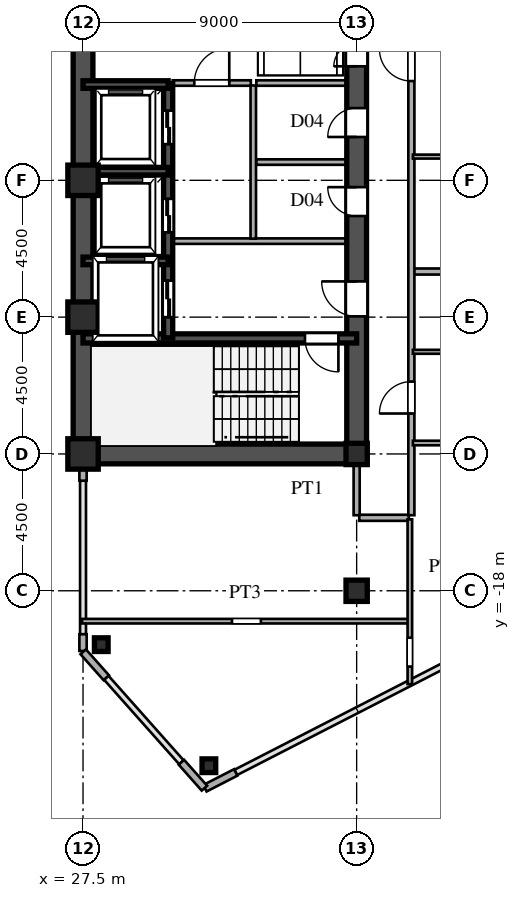
"""IFC4 building model, lengths in metres.
Left out: names, types, materials, properties, quantities, classifications, styles, units other than length and angle.
Written with IfcOpenShell. Run it as: python <this file> out.ifc"""

import sys

from ifc_helpers import new_model, si_unit, direction, frame, frame_2d, origin, origin_2d, place, context, subcontext, project, spatial, rectangle, hollow_rectangle, i_section, extrude, source, transform, mapped, element, fill, save


model = new_model("IFC4")
c1 = context("Model", 3, precision=1e-05, world=origin(), true_north=direction((0.0, 1.0)))
c2 = subcontext(c1, "Body", "Model", "MODEL_VIEW")
j1 = project(units=[si_unit("LENGTHUNIT", "METRE"), si_unit("PLANEANGLEUNIT", "RADIAN")], contexts=[c1])
p1 = place(None, origin())
s1 = spatial("IfcSite", under=j1, at=p1, CompositionType="ELEMENT")
p2 = place(p1, origin())
s2 = spatial("IfcBuilding", under=s1, at=p2, CompositionType="ELEMENT")
p3 = place(p2, frame((0.0, 0.0, 114.0)))
s3 = spatial("IfcBuildingStorey", under=s2, at=p3, CompositionType="ELEMENT", Elevation=114.0)
m1 = source(origin(), c2, "Body", "SweptSolid", [
    extrude(hollow_rectangle(XDim=1.0, YDim=1.0, WallThickness=0.042, at=origin_2d()), origin(), (0.0, 0.0, 1.0), 3.6),
])
for number, where, z_axis, x_axis in (
    (1, (27.5, -13.5, 0.0), (0.0, 0.0, 1.0), (1.0, 0.0, 0.0)),
    (2, (27.5, -9.0, 0.0), (0.0, 0.0, 1.0), (1.0, 0.0, 0.0)),
    (3, (27.5, -4.5, 0.0), (0.0, 0.0, 1.0), (1.0, 0.0, 0.0)),
):
    element("IfcColumn", number, at=place(p3, frame(where, z_axis=z_axis, x_axis=x_axis)), inside=s3, PredefinedType="COLUMN", context=c2, shape_type="MappedRepresentation", body=[
        mapped(m1, transform((0.0, 0.0, 0.0), scale=1.0)),
    ])
m2 = source(origin(), c2, "Body", "SweptSolid", [
    extrude(i_section(OverallWidth=0.7, OverallDepth=0.7, WebThickness=0.028, FlangeThickness=0.045, at=origin_2d()), origin(), (0.0, 0.0, 1.0), 3.6),
])
for number, where, z_axis, x_axis in (
    (4, (36.5, -18.0, 0.0), (0.0, 0.0, 1.0), (1.0, 0.0, 0.0)),
    (5, (36.5, -13.5, 0.0), (0.0, 0.0, 1.0), (1.0, 0.0, 0.0)),
):
    element("IfcColumn", number, at=place(p3, frame(where, z_axis=z_axis, x_axis=x_axis)), inside=s3, PredefinedType="COLUMN", context=c2, shape_type="MappedRepresentation", body=[
        mapped(m2, transform((0.0, 0.0, 0.0), scale=1.0)),
    ])
m3 = source(origin(), c2, "Body", "SweptSolid", [
    extrude(hollow_rectangle(XDim=0.45, YDim=0.45, WallThickness=0.018, at=origin_2d()), origin(), (0.0, 0.0, 1.0), 3.6),
])
for number, where, z_axis, x_axis in (
    (6, (31.64, -23.754, 0.0), (0.0, 0.0, 1.0), (1.0, 0.0, 0.0)),
    (7, (28.1, -19.772, 0.0), (0.0, 0.0, 1.0), (1.0, 0.0, 0.0)),
):
    element("IfcColumn", number, at=place(p3, frame(where, z_axis=z_axis, x_axis=x_axis)), inside=s3, PredefinedType="COLUMN", context=c2, shape_type="MappedRepresentation", body=[
        mapped(m3, transform((0.0, 0.0, 0.0), scale=1.0)),
    ])
p4 = place(p3, frame((31.509, -24.495, 0.0), z_axis=(0.0, 0.0, 1.0), x_axis=(0.889797395748, 0.456355776255, 0.0)))
e8 = element("IfcWall", 8, at=p4, inside=s3, PredefinedType="SOLIDWALL", context=c2, shape_type="SweptSolid", body=[
    extrude(rectangle(XDim=1.14, YDim=0.24, at=frame_2d((0.57, 0.0))), origin(), (0.0, 0.0, 1.0), 3.38),
])
p5 = place(p3, frame((27.5, -19.98, 0.0), z_axis=(0.0, 0.0, 1.0), x_axis=(0.0, 1.0, 0.0)))
e9 = element("IfcWall", 9, at=p5, inside=s3, PredefinedType="SOLIDWALL", context=c2, shape_type="SweptSolid", body=[
    extrude(rectangle(XDim=0.55, YDim=0.24, at=frame_2d((0.275, 0.0))), origin(), (0.0, 0.0, 1.0), 3.38),
])
p6 = place(p3, frame((27.5, -14.38, 0.0), z_axis=(0.0, 0.0, 1.0), x_axis=(0.0, 1.0, 0.0)))
e10 = element("IfcWall", 10, at=p6, inside=s3, PredefinedType="SOLIDWALL", context=c2, shape_type="SweptSolid", body=[
    extrude(rectangle(XDim=0.55, YDim=0.24, at=frame_2d((0.275, 0.0))), origin(), (0.0, 0.0, 1.0), 2.88),
])
for number, where, z_axis, x_axis in (
    (11, (27.507, -20.008, 0.0), (0.0, 0.0, 1.0), (0.664, -0.747, 0.0)),
    (12, (30.736, -23.64, 0.0), (0.0, 0.0, 1.0), (0.664, -0.747, 0.0)),
):
    element("IfcWall", number, at=place(p3, frame(where, z_axis=z_axis, x_axis=x_axis)), inside=s3, PredefinedType="SOLIDWALL", context=c2, shape_type="SweptSolid", body=[
        extrude(rectangle(XDim=1.14, YDim=0.24, at=frame_2d((0.57, 0.0))), origin(), (0.0, 0.0, 1.0), 3.38),
    ])
p7 = place(p3, frame((27.5, -13.5, 0.0), z_axis=(0.0, 0.0, 1.0), x_axis=(0.0, 1.0, 0.0)))
e13 = element("IfcWall", 13, at=p7, inside=s3, PredefinedType="SHEAR", context=c2, shape_type="SweptSolid", body=[
    extrude(rectangle(XDim=12.2, YDim=0.65, at=frame_2d((6.1, 0.0))), origin(), (0.0, 0.0, 1.0), 3.38),
])
p8 = place(p3, frame((27.5, -1.3, 0.0), z_axis=(0.0, 0.0, 1.0), x_axis=(0.0, 1.0, 0.0)))
e14 = element("IfcWall", 14, at=p8, inside=s3, PredefinedType="SHEAR", context=c2, shape_type="SweptSolid", body=[
    extrude(rectangle(XDim=2.6, YDim=0.65, at=frame_2d((1.3, 0.0))), origin(), (0.0, 0.0, 1.0), 3.38),
])
p9 = place(p3, frame((27.5, -13.5, 0.0), z_axis=(0.0, 0.0, 1.0), x_axis=(1.0, 0.0, 0.0)))
e15 = element("IfcWall", 15, at=p9, inside=s3, PredefinedType="SHEAR", context=c2, shape_type="SweptSolid", body=[
    extrude(rectangle(XDim=9.0, YDim=0.65, at=frame_2d((4.5, 0.0))), origin(), (0.0, 0.0, 1.0), 3.38),
])
p10 = place(p3, frame((36.5, -13.65, 0.0), z_axis=(0.0, 0.0, 1.0), x_axis=(0.0, 1.0, 0.0)))
e16 = element("IfcWall", 16, at=p10, inside=s3, PredefinedType="SHEAR", context=c2, shape_type="SweptSolid", body=[
    extrude(rectangle(XDim=7.15, YDim=0.65, at=frame_2d((3.575, 0.0))), origin(), (0.0, 0.0, 1.0), 3.38),
])
p11 = place(p10, frame((4.675, 0.0, 0.0)))
e17 = element("IfcOpeningElement", 17, at=p11, cuts=e16, PredefinedType="OPENING", context=c2, shape_type="SweptSolid", body=[
    extrude(rectangle(XDim=1.15, YDim=2.2, at=frame_2d((0.575, 1.1))), frame((0.0, 0.335, 0.0), z_axis=(0.0, -1.0, 0.0), x_axis=(1.0, 0.0, 0.0)), (0.0, 0.0, 1.0), 0.67),
])
p12 = place(p3, frame((36.5, -1.3, 0.0), z_axis=(0.0, 0.0, 1.0), x_axis=(0.0, 1.0, 0.0)))
e18 = element("IfcWall", 18, at=p12, inside=s3, PredefinedType="SHEAR", context=c2, shape_type="SweptSolid", body=[
    extrude(rectangle(XDim=2.6, YDim=0.65, at=frame_2d((1.3, 0.0))), origin(), (0.0, 0.0, 1.0), 3.38),
])
p13 = place(p12, frame((0.55, 0.0, 0.0)))
e19 = element("IfcOpeningElement", 19, at=p13, cuts=e18, PredefinedType="OPENING", context=c2, shape_type="SweptSolid", body=[
    extrude(rectangle(XDim=1.5, YDim=2.3, at=frame_2d((0.75, 1.15))), frame((0.0, 0.335, 0.0), z_axis=(0.0, -1.0, 0.0), x_axis=(1.0, 0.0, 0.0)), (0.0, 0.0, 1.0), 0.67),
])
p14 = place(p3, frame((36.5, -6.5, 0.0), z_axis=(0.0, 0.0, 1.0), x_axis=(0.0, 1.0, 0.0)))
e20 = element("IfcWall", 20, at=p14, inside=s3, PredefinedType="SHEAR", context=c2, shape_type="SweptSolid", body=[
    extrude(rectangle(XDim=2.6, YDim=0.65, at=frame_2d((1.3, 0.0))), origin(), (0.0, 0.0, 1.0), 3.38),
])
p15 = place(p14, frame((0.825, 0.0, 0.0)))
e21 = element("IfcOpeningElement", 21, at=p15, cuts=e20, PredefinedType="OPENING", context=c2, shape_type="SweptSolid", body=[
    extrude(rectangle(XDim=0.95, YDim=2.15, at=frame_2d((0.475, 1.075))), frame((0.0, 0.335, 0.0), z_axis=(0.0, -1.0, 0.0), x_axis=(1.0, 0.0, 0.0)), (0.0, 0.0, 1.0), 0.67),
])
p16 = place(p3, frame((36.5, -3.9, 0.0), z_axis=(0.0, 0.0, 1.0), x_axis=(0.0, 1.0, 0.0)))
e22 = element("IfcWall", 22, at=p16, inside=s3, PredefinedType="SHEAR", context=c2, shape_type="SweptSolid", body=[
    extrude(rectangle(XDim=2.6, YDim=0.65, at=frame_2d((1.3, 0.0))), origin(), (0.0, 0.0, 1.0), 3.38),
])
p17 = place(p16, frame((0.825, 0.0, 0.0)))
e23 = element("IfcOpeningElement", 23, at=p17, cuts=e22, PredefinedType="OPENING", context=c2, shape_type="SweptSolid", body=[
    extrude(rectangle(XDim=0.95, YDim=2.15, at=frame_2d((0.475, 1.075))), frame((0.0, 0.335, 0.0), z_axis=(0.0, -1.0, 0.0), x_axis=(1.0, 0.0, 0.0)), (0.0, 0.0, 1.0), 0.67),
])
p18 = place(p3, frame((27.5, -9.7, 0.0), z_axis=(0.0, 0.0, 1.0), x_axis=(1.0, 0.0, 0.0)))
e24 = element("IfcWall", 24, at=p18, inside=s3, PredefinedType="SHEAR", context=c2, shape_type="SweptSolid", body=[
    extrude(rectangle(XDim=9.0, YDim=0.3, at=frame_2d((4.5, 0.0))), origin(), (0.0, 0.0, 1.0), 3.38),
])
p19 = place(p18, frame((7.3, 0.0, 0.0)))
e25 = element("IfcOpeningElement", 25, at=p19, cuts=e24, PredefinedType="OPENING", context=c2, shape_type="SweptSolid", body=[
    extrude(rectangle(XDim=1.1, YDim=2.2, at=frame_2d((0.55, 1.1))), frame((0.0, 0.16, 0.0), z_axis=(0.0, -1.0, 0.0), x_axis=(1.0, 0.0, 0.0)), (0.0, 0.0, 1.0), 0.32),
])
for number, where, z_axis, x_axis in (
    (26, (27.5, -7.15, 0.0), (0.0, 0.0, 1.0), (1.0, 0.0, 0.0)),
    (27, (27.5, -4.2, 0.0), (0.0, 0.0, 1.0), (1.0, 0.0, 0.0)),
    (28, (27.5, -1.35, 0.0), (0.0, 0.0, 1.0), (1.0, 0.0, 0.0)),
):
    element("IfcWall", number, at=place(p3, frame(where, z_axis=z_axis, x_axis=x_axis)), inside=s3, PredefinedType="SHEAR", context=c2, shape_type="SweptSolid", body=[
        extrude(rectangle(XDim=2.8, YDim=0.25, at=frame_2d((1.4, 0.0))), origin(), (0.0, 0.0, 1.0), 3.38),
    ])
p20 = place(p3, frame((30.3, -9.68, 0.0), z_axis=(0.0, 0.0, 1.0), x_axis=(0.0, 1.0, 0.0)))
e29 = element("IfcWall", 29, at=p20, inside=s3, PredefinedType="SHEAR", context=c2, shape_type="SweptSolid", body=[
    extrude(rectangle(XDim=2.56, YDim=0.3, at=frame_2d((1.28, 0.0))), origin(), (0.0, 0.0, 1.0), 3.38),
])
p21 = place(p20, frame((0.68, 0.0, 0.0)))
e30 = element("IfcOpeningElement", 30, at=p21, cuts=e29, PredefinedType="OPENING", context=c2, shape_type="SweptSolid", body=[
    extrude(rectangle(XDim=1.2, YDim=2.25, at=frame_2d((0.6, 1.125))), frame((0.0, 0.16, 0.0), z_axis=(0.0, -1.0, 0.0), x_axis=(1.0, 0.0, 0.0)), (0.0, 0.0, 1.0), 0.32),
])
p22 = place(p3, frame((30.3, -7.12, 0.0), z_axis=(0.0, 0.0, 1.0), x_axis=(0.0, 1.0, 0.0)))
e31 = element("IfcWall", 31, at=p22, inside=s3, PredefinedType="SHEAR", context=c2, shape_type="SweptSolid", body=[
    extrude(rectangle(XDim=2.92, YDim=0.3, at=frame_2d((1.46, 0.0))), origin(), (0.0, 0.0, 1.0), 3.38),
])
p23 = place(p22, frame((0.91, 0.0, 0.0)))
e32 = element("IfcOpeningElement", 32, at=p23, cuts=e31, PredefinedType="OPENING", context=c2, shape_type="SweptSolid", body=[
    extrude(rectangle(XDim=1.1, YDim=2.2, at=frame_2d((0.55, 1.1))), frame((0.0, 0.16, 0.0), z_axis=(0.0, -1.0, 0.0), x_axis=(1.0, 0.0, 0.0)), (0.0, 0.0, 1.0), 0.32),
])
p24 = place(p3, frame((30.3, -4.2, 0.0), z_axis=(0.0, 0.0, 1.0), x_axis=(0.0, 1.0, 0.0)))
e33 = element("IfcWall", 33, at=p24, inside=s3, PredefinedType="SHEAR", context=c2, shape_type="SweptSolid", body=[
    extrude(rectangle(XDim=2.88, YDim=0.3, at=frame_2d((1.44, 0.0))), origin(), (0.0, 0.0, 1.0), 3.38),
])
p25 = place(p24, frame((0.89, 0.0, 0.0)))
e34 = element("IfcOpeningElement", 34, at=p25, cuts=e33, PredefinedType="OPENING", context=c2, shape_type="SweptSolid", body=[
    extrude(rectangle(XDim=1.1, YDim=2.2, at=frame_2d((0.55, 1.1))), frame((0.0, 0.16, 0.0), z_axis=(0.0, -1.0, 0.0), x_axis=(1.0, 0.0, 0.0)), (0.0, 0.0, 1.0), 0.32),
])
p26 = place(p3, frame((30.45, -6.5, 0.0), z_axis=(0.0, 0.0, 1.0), x_axis=(1.0, 0.0, 0.0)))
e35 = element("IfcWall", 35, at=p26, inside=s3, PredefinedType="PARTITIONING", context=c2, shape_type="SweptSolid", body=[
    extrude(rectangle(XDim=5.7, YDim=0.18, at=frame_2d((2.85, 0.0))), origin(), (0.0, 0.0, 1.0), 3.38),
])
p27 = place(p3, frame((33.1, -6.42, 0.0), z_axis=(0.0, 0.0, 1.0), x_axis=(0.0, 1.0, 0.0)))
e36 = element("IfcWall", 36, at=p27, inside=s3, PredefinedType="PARTITIONING", context=c2, shape_type="SweptSolid", body=[
    extrude(rectangle(XDim=5.04, YDim=0.18, at=frame_2d((2.52, 0.0))), origin(), (0.0, 0.0, 1.0), 3.38),
])
p28 = place(p3, frame((30.45, -1.3, 0.0), z_axis=(0.0, 0.0, 1.0), x_axis=(1.0, 0.0, 0.0)))
e37 = element("IfcWall", 37, at=p28, inside=s3, PredefinedType="PARTITIONING", context=c2, shape_type="SweptSolid", body=[
    extrude(rectangle(XDim=2.57, YDim=0.18, at=frame_2d((1.285, 0.0))), origin(), (0.0, 0.0, 1.0), 3.38),
])
p29 = place(p28, frame((0.71, 0.0, 0.0)))
e38 = element("IfcOpeningElement", 38, at=p29, cuts=e37, PredefinedType="OPENING", context=c2, shape_type="SweptSolid", body=[
    extrude(rectangle(XDim=1.15, YDim=2.2, at=frame_2d((0.575, 1.1))), frame((0.0, 0.1, 0.0), z_axis=(0.0, -1.0, 0.0), x_axis=(1.0, 0.0, 0.0)), (0.0, 0.0, 1.0), 0.2),
])
for number, where, z_axis, x_axis in (
    (39, (33.2, -1.3, 0.0), (0.0, 0.0, 1.0), (1.0, 0.0, 0.0)),
    (40, (33.2, -3.9, 0.0), (0.0, 0.0, 1.0), (1.0, 0.0, 0.0)),
):
    element("IfcWall", number, at=place(p3, frame(where, z_axis=z_axis, x_axis=x_axis)), inside=s3, PredefinedType="PARTITIONING", context=c2, shape_type="SweptSolid", body=[
        extrude(rectangle(XDim=2.95, YDim=0.18, at=frame_2d((1.475, 0.0))), origin(), (0.0, 0.0, 1.0), 3.38),
    ])
p30 = place(p3, frame((27.465, -19.0, 0.0), z_axis=(0.0, 0.0, 1.0), x_axis=(1.0, 0.0, 0.0)))
e41 = element("IfcWall", 41, at=p30, inside=s3, PredefinedType="PARTITIONING", context=c2, shape_type="SweptSolid", body=[
    extrude(rectangle(XDim=10.735, YDim=0.15, at=frame_2d((5.367, 0.0))), origin(), (0.0, 0.0, 1.0), 3.38),
])
p31 = place(p30, frame((4.935, 0.0, 0.0)))
e42 = element("IfcOpeningElement", 42, at=p31, cuts=e41, PredefinedType="OPENING", context=c2, shape_type="SweptSolid", body=[
    extrude(rectangle(XDim=0.95, YDim=2.15, at=frame_2d((0.475, 1.075))), frame((0.0, 0.085, 0.0), z_axis=(0.0, -1.0, 0.0), x_axis=(1.0, 0.0, 0.0)), (0.0, 0.0, 1.0), 0.17),
])
p32 = place(p3, frame((36.585, -15.6, 0.0), z_axis=(0.0, 0.0, 1.0), x_axis=(1.0, 0.0, 0.0)))
e43 = element("IfcWall", 43, at=p32, inside=s3, PredefinedType="PARTITIONING", context=c2, shape_type="SweptSolid", body=[
    extrude(rectangle(XDim=1.63, YDim=0.2, at=frame_2d((0.815, 0.0))), origin(), (0.0, 0.0, 1.0), 3.38),
])
p33 = place(p3, frame((38.35, -13.14, 0.0), z_axis=(0.0, 0.0, 1.0), x_axis=(1.0, 0.0, 0.0)))
e44 = element("IfcWall", 44, at=p33, inside=s3, PredefinedType="PARTITIONING", context=c2, shape_type="SweptSolid", body=[
    extrude(rectangle(XDim=5.7, YDim=0.15, at=frame_2d((2.85, 0.0))), origin(), (0.0, 0.0, 1.0), 3.38),
])
p34 = place(p33, frame((2.375, 0.0, 0.0)))
e45 = element("IfcOpeningElement", 45, at=p34, cuts=e44, PredefinedType="OPENING", context=c2, shape_type="SweptSolid", body=[
    extrude(rectangle(XDim=0.95, YDim=2.15, at=frame_2d((0.475, 1.075))), frame((0.0, 0.085, 0.0), z_axis=(0.0, -1.0, 0.0), x_axis=(1.0, 0.0, 0.0)), (0.0, 0.0, 1.0), 0.17),
])
p35 = place(p3, frame((38.35, -10.14, 0.0), z_axis=(0.0, 0.0, 1.0), x_axis=(1.0, 0.0, 0.0)))
e46 = element("IfcWall", 46, at=p35, inside=s3, PredefinedType="PARTITIONING", context=c2, shape_type="SweptSolid", body=[
    extrude(rectangle(XDim=5.7, YDim=0.13, at=frame_2d((2.85, 0.0))), origin(), (0.0, 0.0, 1.0), 3.38),
])
p36 = place(p35, frame((2.41, 0.0, 0.0)))
e47 = element("IfcOpeningElement", 47, at=p36, cuts=e46, PredefinedType="OPENING", context=c2, shape_type="SweptSolid", body=[
    extrude(rectangle(XDim=0.88, YDim=2.1, at=frame_2d((0.44, 1.05))), frame((0.0, 0.075, 0.0), z_axis=(0.0, -1.0, 0.0), x_axis=(1.0, 0.0, 0.0)), (0.0, 0.0, 1.0), 0.15),
])
p37 = place(p3, frame((38.38, -7.5, 0.0), z_axis=(0.0, 0.0, 1.0), x_axis=(1.0, 0.0, 0.0)))
e48 = element("IfcWall", 48, at=p37, inside=s3, PredefinedType="PARTITIONING", context=c2, shape_type="SweptSolid", body=[
    extrude(rectangle(XDim=26.259, YDim=0.2, at=frame_2d((13.129, 0.0))), origin(), (0.0, 0.0, 1.0), 3.38),
])
p38 = place(p3, frame((38.35, -3.72, 0.0), z_axis=(0.0, 0.0, 1.0), x_axis=(1.0, 0.0, 0.0)))
e49 = element("IfcWall", 49, at=p38, inside=s3, PredefinedType="PARTITIONING", context=c2, shape_type="SweptSolid", body=[
    extrude(rectangle(XDim=5.7, YDim=0.13, at=frame_2d((2.85, 0.0))), origin(), (0.0, 0.0, 1.0), 3.38),
])
p39 = place(p38, frame((2.41, 0.0, 0.0)))
e50 = element("IfcOpeningElement", 50, at=p39, cuts=e49, PredefinedType="OPENING", context=c2, shape_type="SweptSolid", body=[
    extrude(rectangle(XDim=0.88, YDim=2.1, at=frame_2d((0.44, 1.05))), frame((0.0, 0.075, 0.0), z_axis=(0.0, -1.0, 0.0), x_axis=(1.0, 0.0, 0.0)), (0.0, 0.0, 1.0), 0.15),
])
p40 = place(p3, frame((36.5, -15.515, 0.0), z_axis=(0.0, 0.0, 1.0), x_axis=(0.0, 1.0, 0.0)))
e51 = element("IfcWall", 51, at=p40, inside=s3, PredefinedType="PARTITIONING", context=c2, shape_type="SweptSolid", body=[
    extrude(rectangle(XDim=1.685, YDim=0.2, at=frame_2d((0.842, 0.0))), origin(), (0.0, 0.0, 1.0), 2.78),
])
p41 = place(p3, frame((38.25, -21.071, 0.0), z_axis=(0.0, 0.0, 1.0), x_axis=(0.0, 1.0, 0.0)))
e52 = element("IfcWall", 52, at=p41, inside=s3, PredefinedType="PARTITIONING", context=c2, shape_type="SweptSolid", body=[
    extrude(rectangle(XDim=5.421, YDim=0.15, at=frame_2d((2.71, 0.0))), origin(), (0.0, 0.0, 1.0), 3.38),
])
p42 = place(p41, frame((0.578, 0.0, 0.0)))
e53 = element("IfcOpeningElement", 53, at=p42, cuts=e52, PredefinedType="OPENING", context=c2, shape_type="SweptSolid", body=[
    extrude(rectangle(XDim=0.95, YDim=2.15, at=frame_2d((0.475, 1.075))), frame((0.0, 0.085, 0.0), z_axis=(0.0, -1.0, 0.0), x_axis=(1.0, 0.0, 0.0)), (0.0, 0.0, 1.0), 0.17),
])
p43 = place(p3, frame((38.3, -15.515, 0.0), z_axis=(0.0, 0.0, 1.0), x_axis=(0.0, 1.0, 0.0)))
e54 = element("IfcWall", 54, at=p43, inside=s3, PredefinedType="PARTITIONING", context=c2, shape_type="SweptSolid", body=[
    extrude(rectangle(XDim=31.03, YDim=0.2, at=frame_2d((15.515, 0.0))), origin(), (0.0, 0.0, 1.0), 3.38),
])
p44 = place(p43, frame((3.345, 0.0, 0.0)))
e55 = element("IfcOpeningElement", 55, at=p44, cuts=e54, PredefinedType="OPENING", context=c2, shape_type="SweptSolid", body=[
    extrude(rectangle(XDim=1.05, YDim=2.25, at=frame_2d((0.525, 1.125))), frame((0.0, 0.11, 0.0), z_axis=(0.0, -1.0, 0.0), x_axis=(1.0, 0.0, 0.0)), (0.0, 0.0, 1.0), 0.22),
])
p45 = place(p43, frame((14.28, 0.0, 0.0)))
e56 = element("IfcOpeningElement", 56, at=p45, cuts=e54, PredefinedType="OPENING", context=c2, shape_type="SweptSolid", body=[
    extrude(rectangle(XDim=1.05, YDim=2.25, at=frame_2d((0.525, 1.125))), frame((0.0, 0.11, 0.0), z_axis=(0.0, -1.0, 0.0), x_axis=(1.0, 0.0, 0.0)), (0.0, 0.0, 1.0), 0.22),
])
p46 = place(p43, frame((26.067, 0.0, 0.0)))
e57 = element("IfcOpeningElement", 57, at=p46, cuts=e54, PredefinedType="OPENING", context=c2, shape_type="SweptSolid", body=[
    extrude(rectangle(XDim=1.05, YDim=2.25, at=frame_2d((0.525, 1.125))), frame((0.0, 0.11, 0.0), z_axis=(0.0, -1.0, 0.0), x_axis=(1.0, 0.0, 0.0)), (0.0, 0.0, 1.0), 0.22),
])
m4 = source(origin(), c2, "Body", "SweptSolid", [
    extrude(rectangle(XDim=1.15, YDim=2.2, at=frame_2d((0.575, 1.1))), frame((0.0, 0.025, 0.0), z_axis=(0.0, -1.0, 0.0), x_axis=(1.0, 0.0, 0.0)), (0.0, 0.0, 1.0), 0.05),
])
p47 = place(p11, origin())
e58 = element("IfcDoor", 58, at=p47, inside=s3, OperationType="SINGLE_SWING_RIGHT", PredefinedType="DOOR", context=c2, shape_type="MappedRepresentation", body=[
    mapped(m4, transform((0.0, 0.0, 0.0), scale=1.0)),
])
fill(e17, e58)
m5 = source(origin(), c2, "Body", "SweptSolid", [
    extrude(rectangle(XDim=1.5, YDim=2.3, at=frame_2d((0.75, 1.15))), frame((0.0, 0.025, 0.0), z_axis=(0.0, -1.0, 0.0), x_axis=(1.0, 0.0, 0.0)), (0.0, 0.0, 1.0), 0.05),
])
p48 = place(p13, origin())
e59 = element("IfcDoor", 59, at=p48, inside=s3, OperationType="DOUBLE_SWING_LEFT", PredefinedType="DOOR", context=c2, shape_type="MappedRepresentation", body=[
    mapped(m5, transform((0.0, 0.0, 0.0), scale=1.0)),
])
fill(e19, e59)
m6 = source(origin(), c2, "Body", "SweptSolid", [
    extrude(rectangle(XDim=0.95, YDim=2.15, at=frame_2d((0.475, 1.075))), frame((0.0, 0.025, 0.0), z_axis=(0.0, -1.0, 0.0), x_axis=(1.0, 0.0, 0.0)), (0.0, 0.0, 1.0), 0.05),
])
p49 = place(p15, origin())
e60 = element("IfcDoor", 60, at=p49, inside=s3, OperationType="SINGLE_SWING_RIGHT", PredefinedType="DOOR", context=c2, shape_type="MappedRepresentation", body=[
    mapped(m6, transform((0.0, 0.0, 0.0), scale=1.0)),
])
fill(e21, e60)
p50 = place(p17, origin())
e61 = element("IfcDoor", 61, at=p50, inside=s3, OperationType="SINGLE_SWING_LEFT", PredefinedType="DOOR", context=c2, shape_type="MappedRepresentation", body=[
    mapped(m6, transform((0.0, 0.0, 0.0), scale=1.0)),
])
fill(e23, e61)
m7 = source(origin(), c2, "Body", "SweptSolid", [
    extrude(rectangle(XDim=1.1, YDim=2.2, at=frame_2d((0.55, 1.1))), frame((0.0, 0.025, 0.0), z_axis=(0.0, -1.0, 0.0), x_axis=(1.0, 0.0, 0.0)), (0.0, 0.0, 1.0), 0.05),
])
p51 = place(p19, frame((1.1, 0.0, 0.0), z_axis=(0.0, 0.0, 1.0), x_axis=(-1.0, 0.0, 0.0)))
e62 = element("IfcDoor", 62, at=p51, inside=s3, OperationType="SINGLE_SWING_RIGHT", PredefinedType="DOOR", context=c2, shape_type="MappedRepresentation", body=[
    mapped(m7, transform((0.0, 0.0, 0.0), scale=1.0)),
])
fill(e25, e62)
m8 = source(origin(), c2, "Body", "SweptSolid", [
    extrude(rectangle(XDim=1.2, YDim=2.25, at=frame_2d((0.6, 1.125))), frame((0.0, 0.025, 0.0), z_axis=(0.0, -1.0, 0.0), x_axis=(1.0, 0.0, 0.0)), (0.0, 0.0, 1.0), 0.05),
])
p52 = place(p21, origin())
e63 = element("IfcDoor", 63, at=p52, inside=s3, OperationType="DOUBLE_DOOR_SLIDING", PredefinedType="DOOR", context=c2, shape_type="MappedRepresentation", body=[
    mapped(m8, transform((0.0, 0.0, 0.0), scale=1.0)),
])
fill(e30, e63)
m9 = source(origin(), c2, "Body", "SweptSolid", [
    extrude(rectangle(XDim=1.1, YDim=2.2, at=frame_2d((0.55, 1.1))), frame((0.0, 0.025, 0.0), z_axis=(0.0, -1.0, 0.0), x_axis=(1.0, 0.0, 0.0)), (0.0, 0.0, 1.0), 0.05),
])
p53 = place(p23, origin())
e64 = element("IfcDoor", 64, at=p53, inside=s3, OperationType="DOUBLE_DOOR_SLIDING", PredefinedType="DOOR", context=c2, shape_type="MappedRepresentation", body=[
    mapped(m9, transform((0.0, 0.0, 0.0), scale=1.0)),
])
fill(e32, e64)
p54 = place(p25, origin())
e65 = element("IfcDoor", 65, at=p54, inside=s3, OperationType="DOUBLE_DOOR_SLIDING", PredefinedType="DOOR", context=c2, shape_type="MappedRepresentation", body=[
    mapped(m9, transform((0.0, 0.0, 0.0), scale=1.0)),
])
fill(e34, e65)
p55 = place(p29, origin())
e66 = element("IfcDoor", 66, at=p55, inside=s3, OperationType="SINGLE_SWING_RIGHT", PredefinedType="DOOR", context=c2, shape_type="MappedRepresentation", body=[
    mapped(m4, transform((0.0, 0.0, 0.0), scale=1.0)),
])
fill(e38, e66)
m10 = source(origin(), c2, "Body", "SweptSolid", [
    extrude(rectangle(XDim=1.05, YDim=2.25, at=frame_2d((0.525, 1.125))), frame((0.0, 0.025, 0.0), z_axis=(0.0, -1.0, 0.0), x_axis=(1.0, 0.0, 0.0)), (0.0, 0.0, 1.0), 0.05),
])
p56 = place(p44, origin())
e67 = element("IfcDoor", 67, at=p56, inside=s3, OperationType="SINGLE_SWING_LEFT", PredefinedType="DOOR", context=c2, shape_type="MappedRepresentation", body=[
    mapped(m10, transform((0.0, 0.0, 0.0), scale=1.0)),
])
fill(e55, e67)
p57 = place(p45, origin())
e68 = element("IfcDoor", 68, at=p57, inside=s3, OperationType="SINGLE_SWING_RIGHT", PredefinedType="DOOR", context=c2, shape_type="MappedRepresentation", body=[
    mapped(m10, transform((0.0, 0.0, 0.0), scale=1.0)),
])
fill(e56, e68)
save(model, sys.argv[1])
